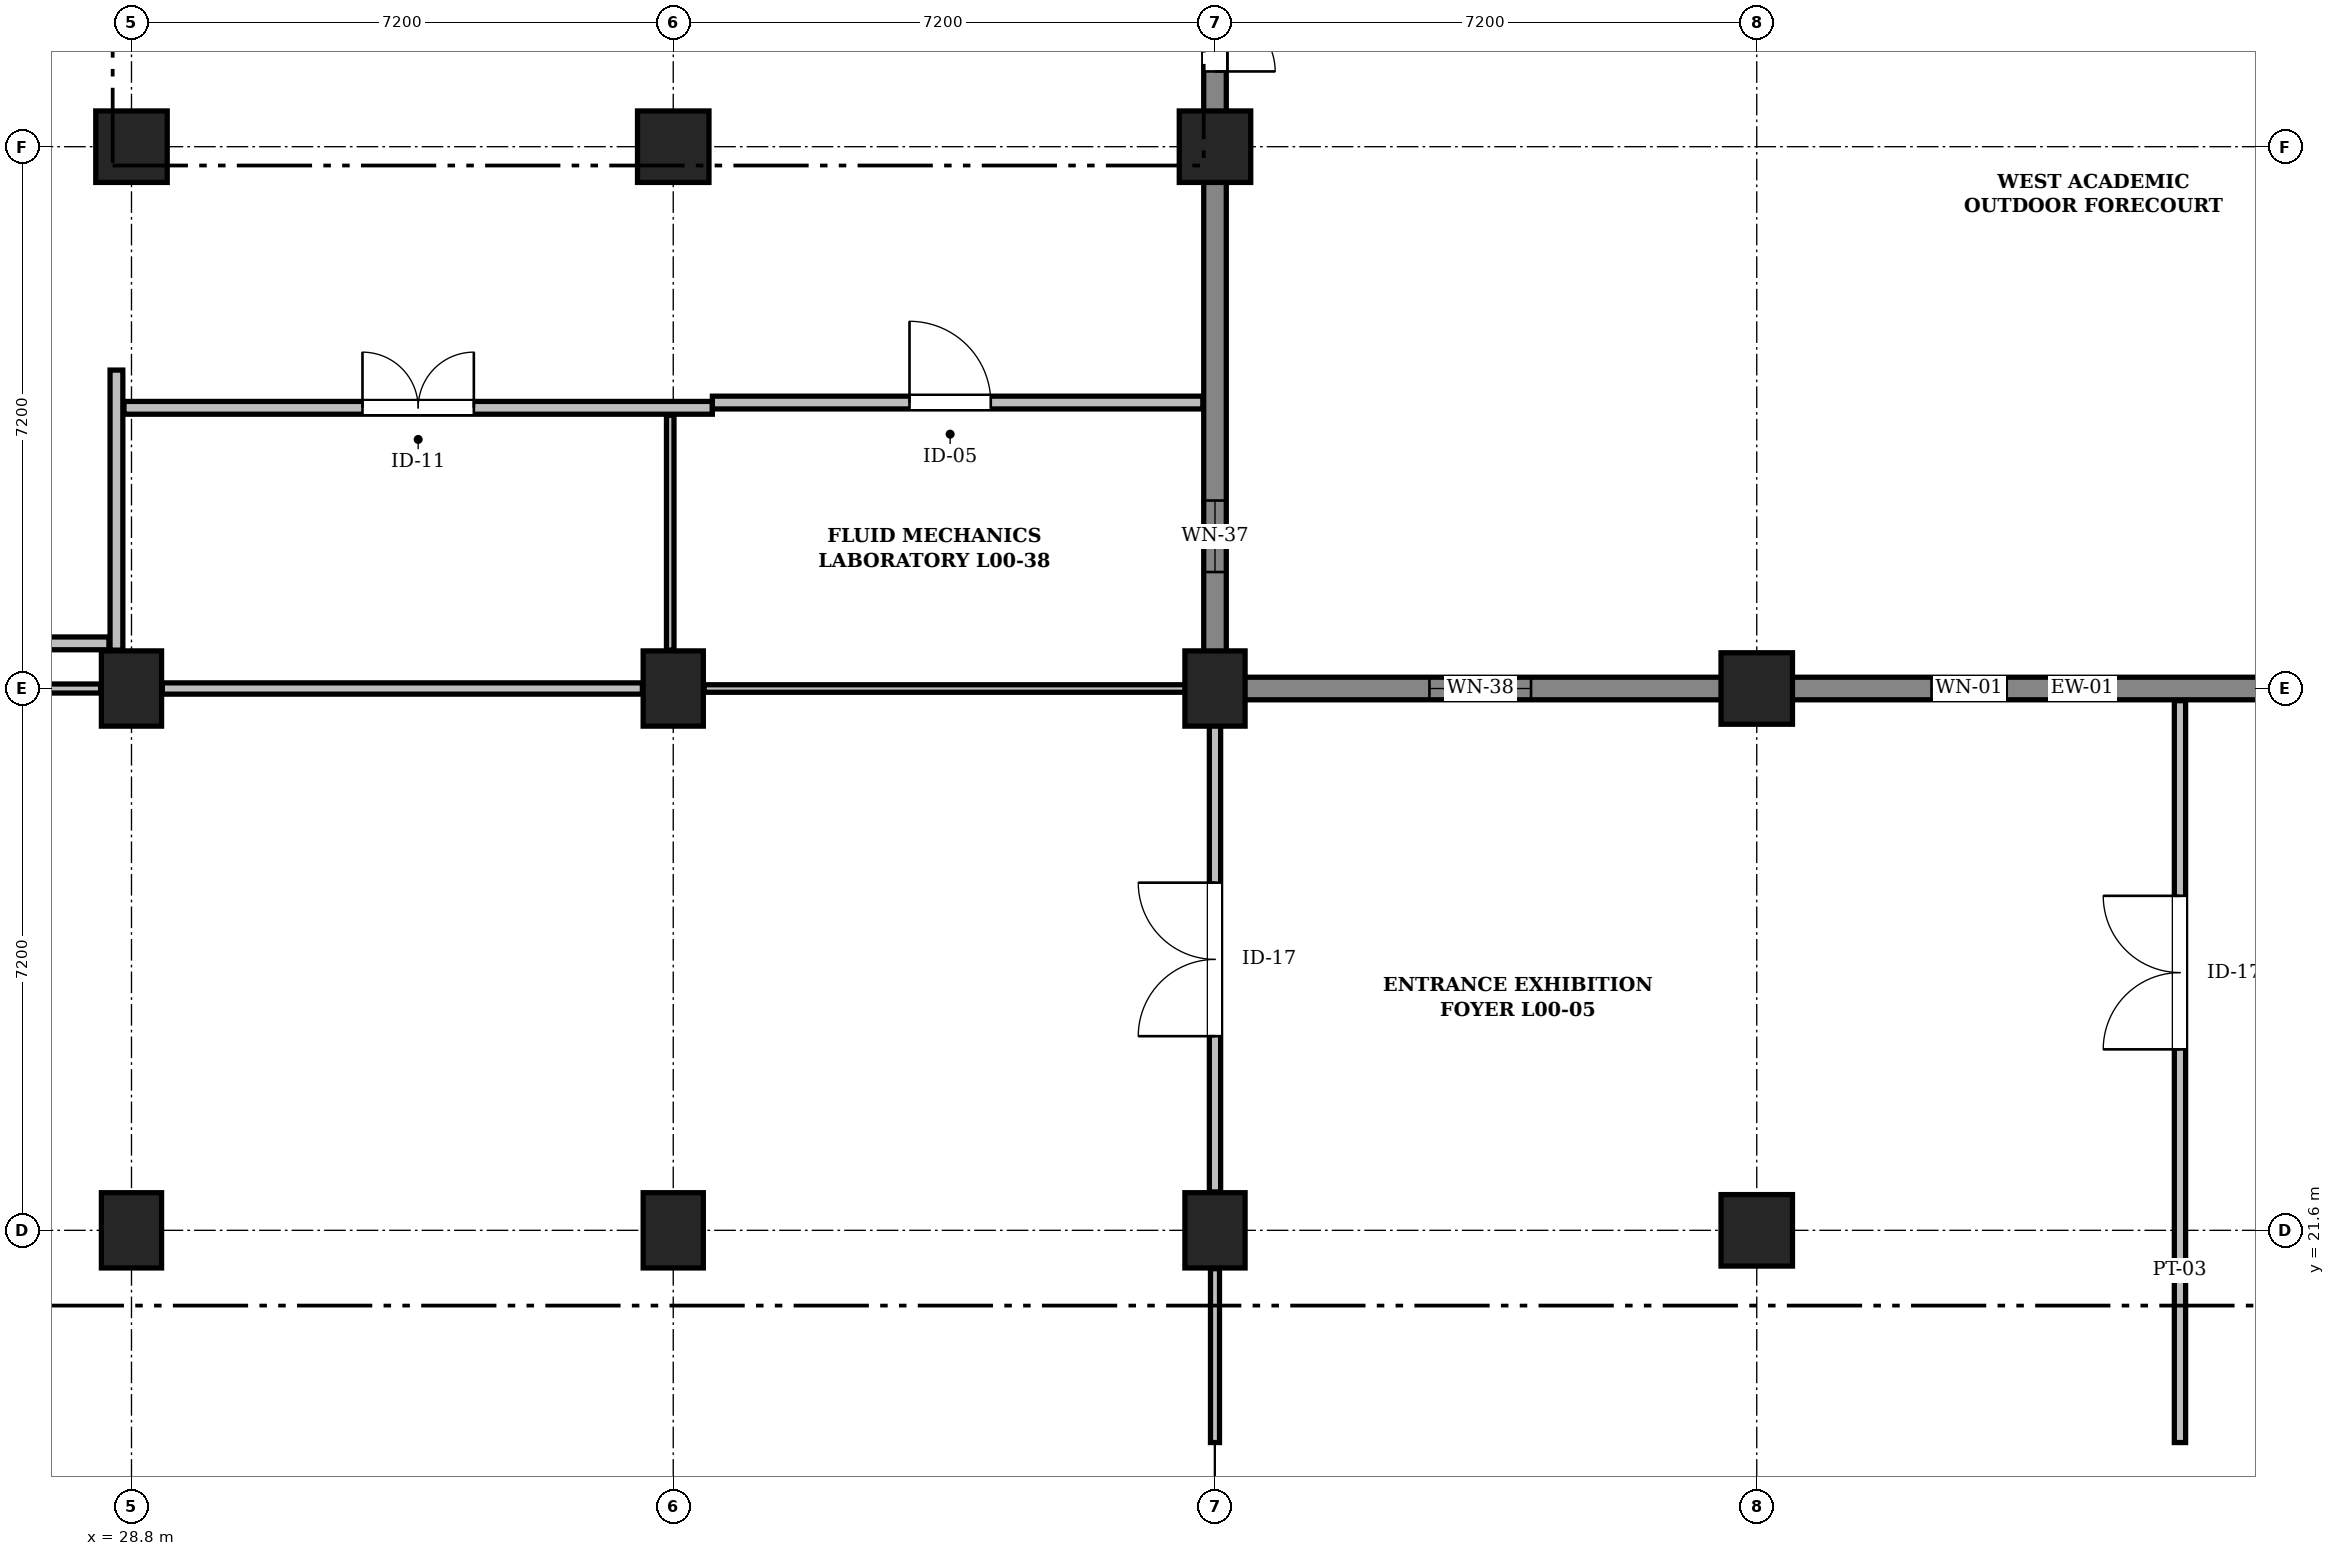
"""IFC4 building model, lengths in metres.
Left out: names, types, materials, properties, quantities, classifications, styles, units other than length and angle.
Written with IfcOpenShell. Run it as: python <this file> out.ifc"""

import sys

from ifc_helpers import new_model, si_unit, direction, frame, frame_2d, origin, origin_2d, place, context, subcontext, project, spatial, rectangle, extrude, element, fill, save


model = new_model("IFC4")
c1 = context("Model", 3, precision=1e-05, world=origin(), true_north=direction((0.0, 1.0)))
c2 = subcontext(c1, "Body", "Model", "MODEL_VIEW")
j1 = project(units=[si_unit("LENGTHUNIT", "METRE"), si_unit("PLANEANGLEUNIT", "RADIAN")], contexts=[c1])
p1 = place(None, origin())
s1 = spatial("IfcSite", under=j1, at=p1, CompositionType="ELEMENT")
p2 = place(p1, origin())
s2 = spatial("IfcBuilding", under=s1, at=p2, CompositionType="ELEMENT")
p3 = place(p2, origin())
s3 = spatial("IfcBuildingStorey", under=s2, at=p3, CompositionType="ELEMENT", Elevation=0.0)
for number, where, z_axis, x_axis in (
    (1, (28.8, 21.6, 0.0), (0.0, 0.0, 1.0), (1.0, 0.0, 0.0)),
    (2, (28.8, 28.8, 0.0), (0.0, 0.0, 1.0), (1.0, 0.0, 0.0)),
):
    element("IfcColumn", number, at=place(p3, frame(where, z_axis=z_axis, x_axis=x_axis)), inside=s3, PredefinedType="COLUMN", context=c2, shape_type="SweptSolid", body=[
        extrude(rectangle(XDim=0.8, YDim=1.0, at=origin_2d()), origin(), (0.0, 0.0, 1.0), 4.8),
    ])
p4 = place(p3, frame((28.8, 36.0, 0.0), z_axis=(0.0, 0.0, 1.0), x_axis=(1.0, 0.0, 0.0)))
e3 = element("IfcColumn", 3, at=p4, inside=s3, PredefinedType="COLUMN", context=c2, shape_type="SweptSolid", body=[
    extrude(rectangle(XDim=0.95, YDim=0.95, at=origin_2d()), origin(), (0.0, 0.0, 1.0), 4.8),
])
for number, where, z_axis, x_axis in (
    (4, (36.0, 21.6, 0.0), (0.0, 0.0, 1.0), (1.0, 0.0, 0.0)),
    (5, (36.0, 28.8, 0.0), (0.0, 0.0, 1.0), (1.0, 0.0, 0.0)),
):
    element("IfcColumn", number, at=place(p3, frame(where, z_axis=z_axis, x_axis=x_axis)), inside=s3, PredefinedType="COLUMN", context=c2, shape_type="SweptSolid", body=[
        extrude(rectangle(XDim=0.8, YDim=1.0, at=origin_2d()), origin(), (0.0, 0.0, 1.0), 4.8),
    ])
p5 = place(p3, frame((36.0, 36.0, 0.0), z_axis=(0.0, 0.0, 1.0), x_axis=(1.0, 0.0, 0.0)))
e6 = element("IfcColumn", 6, at=p5, inside=s3, PredefinedType="COLUMN", context=c2, shape_type="SweptSolid", body=[
    extrude(rectangle(XDim=0.95, YDim=0.95, at=origin_2d()), origin(), (0.0, 0.0, 1.0), 4.8),
])
for number, where, z_axis, x_axis in (
    (7, (43.2, 21.6, 0.0), (0.0, 0.0, 1.0), (1.0, 0.0, 0.0)),
    (8, (43.2, 28.8, 0.0), (0.0, 0.0, 1.0), (1.0, 0.0, 0.0)),
):
    element("IfcColumn", number, at=place(p3, frame(where, z_axis=z_axis, x_axis=x_axis)), inside=s3, PredefinedType="COLUMN", context=c2, shape_type="SweptSolid", body=[
        extrude(rectangle(XDim=0.8, YDim=1.0, at=origin_2d()), origin(), (0.0, 0.0, 1.0), 4.8),
    ])
for number, where, z_axis, x_axis in (
    (9, (43.2, 36.0, 0.0), (0.0, 0.0, 1.0), (1.0, 0.0, 0.0)),
    (10, (50.4, 21.6, 0.0), (0.0, 0.0, 1.0), (1.0, 0.0, 0.0)),
    (11, (50.4, 28.8, 0.0), (0.0, 0.0, 1.0), (1.0, 0.0, 0.0)),
):
    element("IfcColumn", number, at=place(p3, frame(where, z_axis=z_axis, x_axis=x_axis)), inside=s3, PredefinedType="COLUMN", context=c2, shape_type="SweptSolid", body=[
        extrude(rectangle(XDim=0.95, YDim=0.95, at=origin_2d()), origin(), (0.0, 0.0, 1.0), 4.8),
    ])
p6 = place(p3, frame((43.2, 43.2, 0.0), z_axis=(0.0, 0.0, 1.0), x_axis=(0.0, -1.0, 0.0)))
e12 = element("IfcWall", 12, at=p6, inside=s3, PredefinedType="SOLIDWALL", context=c2, shape_type="SweptSolid", body=[
    extrude(rectangle(XDim=7.2, YDim=0.3, at=frame_2d((3.6, 0.0))), origin(), (0.0, 0.0, 1.0), 4.52),
])
p7 = place(p6, frame((4.6, 0.0, 0.0)))
e13 = element("IfcOpeningElement", 13, at=p7, cuts=e12, PredefinedType="OPENING", context=c2, shape_type="SweptSolid", body=[
    extrude(rectangle(XDim=1.6, YDim=2.2, at=frame_2d((0.8, 1.1))), frame((0.0, 0.162, 0.0), z_axis=(0.0, -1.0, 0.0), x_axis=(1.0, 0.0, 0.0)), (0.0, 0.0, 1.0), 0.324),
])
p8 = place(p3, frame((43.2, 36.0, 0.0), z_axis=(0.0, 0.0, 1.0), x_axis=(0.0, -1.0, 0.0)))
e14 = element("IfcWall", 14, at=p8, inside=s3, PredefinedType="SOLIDWALL", context=c2, shape_type="SweptSolid", body=[
    extrude(rectangle(XDim=7.034, YDim=0.3, at=frame_2d((3.517, 0.0))), origin(), (0.0, 0.0, 1.0), 4.52),
])
p9 = place(p8, frame((4.702, 0.0, 0.95)))
e15 = element("IfcOpeningElement", 15, at=p9, cuts=e14, PredefinedType="OPENING", context=c2, shape_type="SweptSolid", body=[
    extrude(rectangle(XDim=0.95, YDim=2.05, at=frame_2d((0.475, 1.025))), frame((0.0, 0.162, 0.0), z_axis=(0.0, -1.0, 0.0), x_axis=(1.0, 0.0, 0.0)), (0.0, 0.0, 1.0), 0.324),
])
p10 = place(p3, frame((43.05, 28.8, 0.0), z_axis=(0.0, 0.0, 1.0), x_axis=(1.0, 0.0, 0.0)))
e16 = element("IfcWall", 16, at=p10, inside=s3, PredefinedType="SOLIDWALL", context=c2, shape_type="SweptSolid", body=[
    extrude(rectangle(XDim=7.35, YDim=0.3, at=frame_2d((3.675, 0.0))), origin(), (0.0, 0.0, 1.0), 4.52),
])
p11 = place(p10, frame((3.0, 0.0, 0.95)))
e17 = element("IfcOpeningElement", 17, at=p11, cuts=e16, PredefinedType="OPENING", context=c2, shape_type="SweptSolid", body=[
    extrude(rectangle(XDim=1.35, YDim=2.05, at=frame_2d((0.675, 1.025))), frame((0.0, 0.162, 0.0), z_axis=(0.0, -1.0, 0.0), x_axis=(1.0, 0.0, 0.0)), (0.0, 0.0, 1.0), 0.324),
])
p12 = place(p3, frame((50.4, 28.8, 0.0), z_axis=(0.0, 0.0, 1.0), x_axis=(1.0, 0.0, 0.0)))
e18 = element("IfcWall", 18, at=p12, inside=s3, PredefinedType="SOLIDWALL", context=c2, shape_type="SweptSolid", body=[
    extrude(rectangle(XDim=7.2, YDim=0.3, at=frame_2d((3.6, 0.0))), origin(), (0.0, 0.0, 1.0), 4.52),
])
p13 = place(p12, frame((2.322, 0.0, 0.95)))
e19 = element("IfcOpeningElement", 19, at=p13, cuts=e18, PredefinedType="OPENING", context=c2, shape_type="SweptSolid", body=[
    extrude(rectangle(XDim=1.0, YDim=1.3, at=frame_2d((0.5, 0.65))), frame((0.0, 0.162, 0.0), z_axis=(0.0, -1.0, 0.0), x_axis=(1.0, 0.0, 0.0)), (0.0, 0.0, 1.0), 0.324),
])
p14 = place(p3, frame((28.6, 29.31, 0.0), z_axis=(0.0, 0.0, 1.0), x_axis=(0.0, 1.0, 0.0)))
e20 = element("IfcWall", 20, at=p14, inside=s3, PredefinedType="PARTITIONING", context=c2, shape_type="SweptSolid", body=[
    extrude(rectangle(XDim=3.721, YDim=0.17, at=frame_2d((1.861, 0.0))), origin(), (0.0, 0.0, 1.0), 4.08),
])
p15 = place(p3, frame((24.9, 29.4, 0.0), z_axis=(0.0, 0.0, 1.0), x_axis=(1.0, 0.0, 0.0)))
e21 = element("IfcWall", 21, at=p15, inside=s3, PredefinedType="PARTITIONING", context=c2, shape_type="SweptSolid", body=[
    extrude(rectangle(XDim=3.6, YDim=0.17, at=frame_2d((1.8, 0.0))), origin(), (0.0, 0.0, 1.0), 4.46),
])
p16 = place(p3, frame((28.7, 32.53, 0.0), z_axis=(0.0, 0.0, 1.0), x_axis=(1.0, 0.0, 0.0)))
e22 = element("IfcWall", 22, at=p16, inside=s3, PredefinedType="PARTITIONING", context=c2, shape_type="SweptSolid", body=[
    extrude(rectangle(XDim=7.82, YDim=0.17, at=frame_2d((3.91, 0.0))), origin(), (0.0, 0.0, 1.0), 4.46),
])
p17 = place(p16, frame((3.17, 0.0, 0.0)))
e23 = element("IfcOpeningElement", 23, at=p17, cuts=e22, PredefinedType="OPENING", context=c2, shape_type="SweptSolid", body=[
    extrude(rectangle(XDim=1.48, YDim=2.26, at=frame_2d((0.74, 1.13))), frame((0.0, 0.097, 0.0), z_axis=(0.0, -1.0, 0.0), x_axis=(1.0, 0.0, 0.0)), (0.0, 0.0, 1.0), 0.194),
])
p18 = place(p3, frame((36.52, 32.6, 0.0), z_axis=(0.0, 0.0, 1.0), x_axis=(1.0, 0.0, 0.0)))
e24 = element("IfcWall", 24, at=p18, inside=s3, PredefinedType="PARTITIONING", context=c2, shape_type="SweptSolid", body=[
    extrude(rectangle(XDim=6.518, YDim=0.17, at=frame_2d((3.259, 0.0))), origin(), (0.0, 0.0, 1.0), 4.46),
])
p19 = place(p18, frame((2.62, 0.0, 0.0)))
e25 = element("IfcOpeningElement", 25, at=p19, cuts=e24, PredefinedType="OPENING", context=c2, shape_type="SweptSolid", body=[
    extrude(rectangle(XDim=1.08, YDim=2.2, at=frame_2d((0.54, 1.1))), frame((0.0, 0.097, 0.0), z_axis=(0.0, -1.0, 0.0), x_axis=(1.0, 0.0, 0.0)), (0.0, 0.0, 1.0), 0.194),
])
p20 = place(p3, frame((43.2, 22.11, 0.0), z_axis=(0.0, 0.0, 1.0), x_axis=(0.0, 1.0, 0.0)))
e26 = element("IfcWall", 26, at=p20, inside=s3, PredefinedType="PARTITIONING", context=c2, shape_type="SweptSolid", body=[
    extrude(rectangle(XDim=6.528, YDim=0.15, at=frame_2d((3.264, 0.0))), origin(), (0.0, 0.0, 1.0), 4.08),
])
p21 = place(p20, frame((2.07, 0.0, 0.0)))
e27 = element("IfcOpeningElement", 27, at=p21, cuts=e26, PredefinedType="OPENING", context=c2, shape_type="SweptSolid", body=[
    extrude(rectangle(XDim=2.04, YDim=2.34, at=frame_2d((1.02, 1.17))), frame((0.0, 0.087, 0.0), z_axis=(0.0, -1.0, 0.0), x_axis=(1.0, 0.0, 0.0)), (0.0, 0.0, 1.0), 0.174),
])
p22 = place(p3, frame((43.2, 18.78, 0.0), z_axis=(0.0, 0.0, 1.0), x_axis=(0.0, 1.0, 0.0)))
e28 = element("IfcWall", 28, at=p22, inside=s3, PredefinedType="PARTITIONING", context=c2, shape_type="SweptSolid", body=[
    extrude(rectangle(XDim=2.31, YDim=0.12, at=frame_2d((1.155, 0.0))), origin(), (0.0, 0.0, 1.0), 4.08),
])
p23 = place(p3, frame((29.21, 28.8, 0.0), z_axis=(0.0, 0.0, 1.0), x_axis=(1.0, 0.0, 0.0)))
e29 = element("IfcWall", 29, at=p23, inside=s3, PredefinedType="PARTITIONING", context=c2, shape_type="SweptSolid", body=[
    extrude(rectangle(XDim=6.38, YDim=0.15, at=frame_2d((3.19, 0.0))), origin(), (0.0, 0.0, 1.0), 3.83),
])
p24 = place(p3, frame((22.01, 28.8, 0.0), z_axis=(0.0, 0.0, 1.0), x_axis=(1.0, 0.0, 0.0)))
e30 = element("IfcWall", 30, at=p24, inside=s3, PredefinedType="PARTITIONING", context=c2, shape_type="SweptSolid", body=[
    extrude(rectangle(XDim=6.38, YDim=0.12, at=frame_2d((3.19, 0.0))), origin(), (0.0, 0.0, 1.0), 3.83),
])
p25 = place(p3, frame((36.41, 28.8, 0.0), z_axis=(0.0, 0.0, 1.0), x_axis=(1.0, 0.0, 0.0)))
e31 = element("IfcWall", 31, at=p25, inside=s3, PredefinedType="PARTITIONING", context=c2, shape_type="SweptSolid", body=[
    extrude(rectangle(XDim=6.628, YDim=0.1, at=frame_2d((3.314, 0.0))), origin(), (0.0, 0.0, 1.0), 3.83),
])
p26 = place(p3, frame((56.025, 18.78, 0.0), z_axis=(0.0, 0.0, 1.0), x_axis=(0.0, 1.0, 0.0)))
e32 = element("IfcWall", 32, at=p26, inside=s3, PredefinedType="PARTITIONING", context=c2, shape_type="SweptSolid", body=[
    extrude(rectangle(XDim=9.858, YDim=0.15, at=frame_2d((4.929, 0.0))), origin(), (0.0, 0.0, 1.0), 4.46),
])
p27 = place(p26, frame((5.225, 0.0, 0.0)))
e33 = element("IfcOpeningElement", 33, at=p27, cuts=e32, PredefinedType="OPENING", context=c2, shape_type="SweptSolid", body=[
    extrude(rectangle(XDim=2.04, YDim=2.34, at=frame_2d((1.02, 1.17))), frame((0.0, 0.087, 0.0), z_axis=(0.0, -1.0, 0.0), x_axis=(1.0, 0.0, 0.0)), (0.0, 0.0, 1.0), 0.174),
])
p28 = place(p3, frame((35.96, 29.31, 0.0), z_axis=(0.0, 0.0, 1.0), x_axis=(0.0, 1.0, 0.0)))
e34 = element("IfcWall", 34, at=p28, inside=s3, PredefinedType="PARTITIONING", context=c2, shape_type="SweptSolid", body=[
    extrude(rectangle(XDim=3.12, YDim=0.1, at=frame_2d((1.56, 0.0))), origin(), (0.0, 0.0, 1.0), 4.08),
])
p29 = place(p7, origin())
e35 = element("IfcDoor", 35, at=p29, inside=s3, OperationType="DOUBLE_DOOR_SINGLE_SWING", PredefinedType="DOOR", context=c2, shape_type="SweptSolid", body=[
    extrude(rectangle(XDim=1.6, YDim=2.2, at=frame_2d((0.8, 1.1))), frame((0.0, 0.025, 0.0), z_axis=(0.0, -1.0, 0.0), x_axis=(1.0, 0.0, 0.0)), (0.0, 0.0, 1.0), 0.05),
])
fill(e13, e35)
p30 = place(p9, origin())
e36 = element("IfcWindow", 36, at=p30, inside=s3, PartitioningType="SINGLE_PANEL", PredefinedType="WINDOW", context=c2, shape_type="SweptSolid", body=[
    extrude(rectangle(XDim=0.95, YDim=2.05, at=frame_2d((0.475, 1.025))), frame((0.0, 0.03, 0.0), z_axis=(0.0, -1.0, 0.0), x_axis=(1.0, 0.0, 0.0)), (0.0, 0.0, 1.0), 0.06),
])
fill(e15, e36)
p31 = place(p11, origin())
e37 = element("IfcWindow", 37, at=p31, inside=s3, PartitioningType="SINGLE_PANEL", PredefinedType="WINDOW", context=c2, shape_type="SweptSolid", body=[
    extrude(rectangle(XDim=1.35, YDim=2.05, at=frame_2d((0.675, 1.025))), frame((0.0, 0.03, 0.0), z_axis=(0.0, -1.0, 0.0), x_axis=(1.0, 0.0, 0.0)), (0.0, 0.0, 1.0), 0.06),
])
fill(e17, e37)
p32 = place(p13, origin())
e38 = element("IfcWindow", 38, at=p32, inside=s3, PartitioningType="SINGLE_PANEL", PredefinedType="WINDOW", context=c2, shape_type="SweptSolid", body=[
    extrude(rectangle(XDim=1.0, YDim=1.3, at=frame_2d((0.5, 0.65))), frame((0.0, 0.03, 0.0), z_axis=(0.0, -1.0, 0.0), x_axis=(1.0, 0.0, 0.0)), (0.0, 0.0, 1.0), 0.06),
])
fill(e19, e38)
p33 = place(p17, origin())
e39 = element("IfcDoor", 39, at=p33, inside=s3, OperationType="DOUBLE_DOOR_SINGLE_SWING", PredefinedType="DOOR", context=c2, shape_type="SweptSolid", body=[
    extrude(rectangle(XDim=1.48, YDim=2.26, at=frame_2d((0.74, 1.13))), frame((0.0, 0.025, 0.0), z_axis=(0.0, -1.0, 0.0), x_axis=(1.0, 0.0, 0.0)), (0.0, 0.0, 1.0), 0.05),
])
fill(e23, e39)
p34 = place(p19, origin())
e40 = element("IfcDoor", 40, at=p34, inside=s3, OperationType="SINGLE_SWING_LEFT", PredefinedType="DOOR", context=c2, shape_type="SweptSolid", body=[
    extrude(rectangle(XDim=1.08, YDim=2.2, at=frame_2d((0.54, 1.1))), frame((0.0, 0.025, 0.0), z_axis=(0.0, -1.0, 0.0), x_axis=(1.0, 0.0, 0.0)), (0.0, 0.0, 1.0), 0.05),
])
fill(e25, e40)
p35 = place(p21, origin())
e41 = element("IfcDoor", 41, at=p35, inside=s3, OperationType="DOUBLE_DOOR_SINGLE_SWING", PredefinedType="DOOR", context=c2, shape_type="SweptSolid", body=[
    extrude(rectangle(XDim=2.04, YDim=2.34, at=frame_2d((1.02, 1.17))), frame((0.0, 0.025, 0.0), z_axis=(0.0, -1.0, 0.0), x_axis=(1.0, 0.0, 0.0)), (0.0, 0.0, 1.0), 0.05),
])
fill(e27, e41)
p36 = place(p27, origin())
e42 = element("IfcDoor", 42, at=p36, inside=s3, OperationType="DOUBLE_DOOR_SINGLE_SWING", PredefinedType="DOOR", context=c2, shape_type="SweptSolid", body=[
    extrude(rectangle(XDim=2.04, YDim=2.34, at=frame_2d((1.02, 1.17))), frame((0.0, 0.025, 0.0), z_axis=(0.0, -1.0, 0.0), x_axis=(1.0, 0.0, 0.0)), (0.0, 0.0, 1.0), 0.05),
])
fill(e33, e42)
save(model, sys.argv[1])
